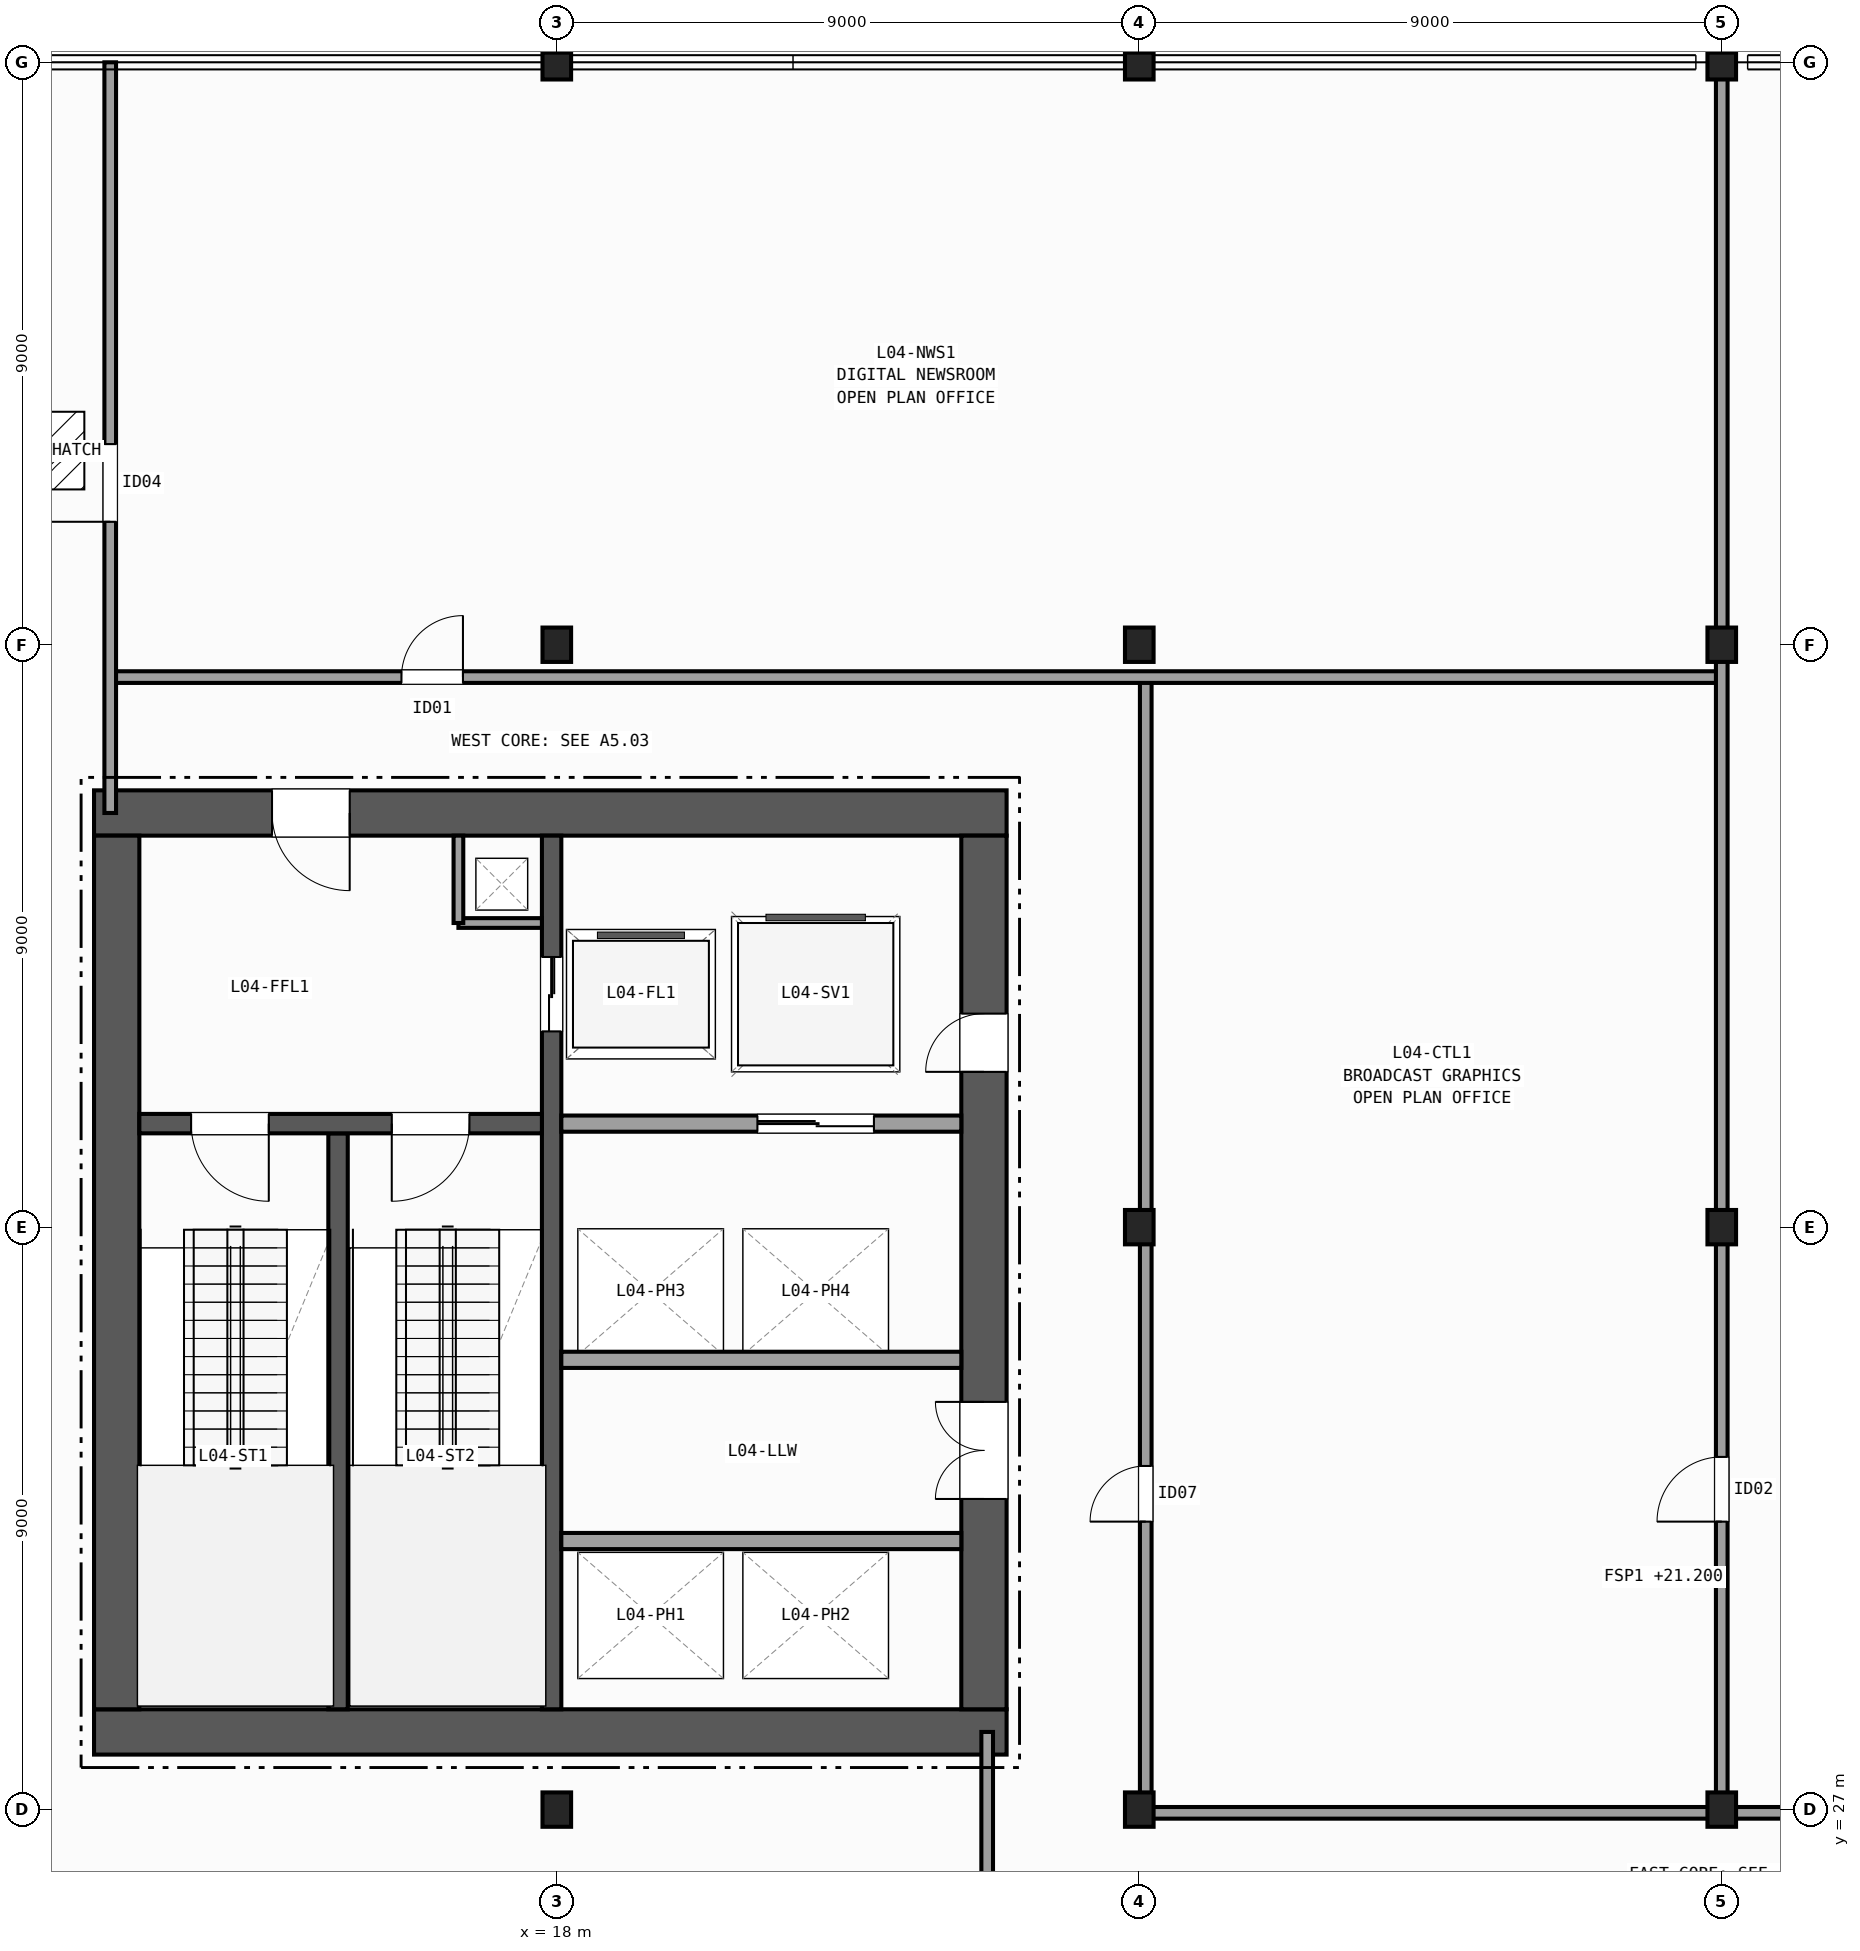
"""IFC4 building model, lengths in metres.
Left out: names, types, materials, properties, quantities, classifications, styles, units other than length and angle.
Written with IfcOpenShell. Run it as: python <this file> out.ifc"""

import sys

from ifc_helpers import new_model, si_unit, direction, frame, frame_2d, origin, origin_2d, place, context, subcontext, project, spatial, rectangle, i_section, extrude, element, fill, save


model = new_model("IFC4")
c1 = context("Model", 3, precision=1e-05, world=origin(), true_north=direction((0.0, 1.0)))
c2 = subcontext(c1, "Body", "Model", "MODEL_VIEW")
j1 = project(units=[si_unit("LENGTHUNIT", "METRE"), si_unit("PLANEANGLEUNIT", "RADIAN")], contexts=[c1])
p1 = place(None, origin())
s1 = spatial("IfcSite", under=j1, at=p1, CompositionType="ELEMENT")
p2 = place(p1, origin())
s2 = spatial("IfcBuilding", under=s1, at=p2, CompositionType="ELEMENT")
p3 = place(p2, frame((0.0, 0.0, 21.2)))
s3 = spatial("IfcBuildingStorey", under=s2, at=p3, CompositionType="ELEMENT", Elevation=21.2)
for number, where, z_axis, x_axis in (
    (1, (18.0, 27.0, 0.0), (0.0, 0.0, 1.0), (1.0, 0.0, 0.0)),
    (2, (18.0, 45.0, 0.0), (0.0, 0.0, 1.0), (1.0, 0.0, 0.0)),
    (3, (18.0, 54.0, 0.0), (0.0, 0.0, 1.0), (1.0, 0.0, 0.0)),
    (4, (27.0, 27.0, 0.0), (0.0, 0.0, 1.0), (1.0, 0.0, 0.0)),
    (5, (27.0, 36.0, 0.0), (0.0, 0.0, 1.0), (1.0, 0.0, 0.0)),
    (6, (27.0, 45.0, 0.0), (0.0, 0.0, 1.0), (1.0, 0.0, 0.0)),
    (7, (27.0, 54.0, 0.0), (0.0, 0.0, 1.0), (1.0, 0.0, 0.0)),
    (8, (36.0, 27.0, 0.0), (0.0, 0.0, 1.0), (1.0, 0.0, 0.0)),
    (9, (36.0, 36.0, 0.0), (0.0, 0.0, 1.0), (1.0, 0.0, 0.0)),
    (10, (36.0, 45.0, 0.0), (0.0, 0.0, 1.0), (1.0, 0.0, 0.0)),
    (11, (36.0, 54.0, 0.0), (0.0, 0.0, 1.0), (1.0, 0.0, 0.0)),
):
    element("IfcColumn", number, at=place(p3, frame(where, z_axis=z_axis, x_axis=x_axis)), inside=s3, PredefinedType="COLUMN", context=c2, shape_type="SweptSolid", body=[
        extrude(i_section(OverallWidth=0.442, OverallDepth=0.531, WebThickness=0.066, FlangeThickness=0.106, FilletRadius=0.015, at=origin_2d()), origin(), (0.0, 0.0, 1.0), 4.8),
    ])
p4 = place(p3, frame((10.85, 28.2, 0.0), z_axis=(0.0, 0.0, 1.0), x_axis=(1.0, 0.0, 0.0)))
e12 = element("IfcWall", 12, at=p4, inside=s3, PredefinedType="SHEAR", context=c2, shape_type="SweptSolid", body=[
    extrude(rectangle(XDim=14.1, YDim=0.7, at=frame_2d((7.05, 0.0))), origin(), (0.0, 0.0, 1.0), 4.48),
])
p5 = place(p3, frame((24.95, 42.4, 0.0), z_axis=(0.0, 0.0, 1.0), x_axis=(-1.0, 0.0, 0.0)))
e13 = element("IfcWall", 13, at=p5, inside=s3, PredefinedType="SHEAR", context=c2, shape_type="SweptSolid", body=[
    extrude(rectangle(XDim=14.1, YDim=0.7, at=frame_2d((7.05, 0.0))), origin(), (0.0, 0.0, 1.0), 4.48),
])
p6 = place(p5, frame((10.15, 0.0, 0.0)))
e14 = element("IfcOpeningElement", 14, at=p6, cuts=e13, PredefinedType="OPENING", context=c2, shape_type="SweptSolid", body=[
    extrude(rectangle(XDim=1.2, YDim=2.15, at=frame_2d((0.6, 1.075))), frame((0.0, 0.36, 0.0), z_axis=(0.0, -1.0, 0.0), x_axis=(1.0, 0.0, 0.0)), (0.0, 0.0, 1.0), 0.72),
])
p7 = place(p3, frame((11.2, 42.05, 0.0), z_axis=(0.0, 0.0, 1.0), x_axis=(0.0, -1.0, 0.0)))
e15 = element("IfcWall", 15, at=p7, inside=s3, PredefinedType="SHEAR", context=c2, shape_type="SweptSolid", body=[
    extrude(rectangle(XDim=13.5, YDim=0.7, at=frame_2d((6.75, 0.0))), origin(), (0.0, 0.0, 1.0), 4.48),
])
p8 = place(p3, frame((24.6, 28.55, 0.0), z_axis=(0.0, 0.0, 1.0), x_axis=(0.0, 1.0, 0.0)))
e16 = element("IfcWall", 16, at=p8, inside=s3, PredefinedType="SHEAR", context=c2, shape_type="SweptSolid", body=[
    extrude(rectangle(XDim=13.5, YDim=0.7, at=frame_2d((6.75, 0.0))), origin(), (0.0, 0.0, 1.0), 4.48),
])
p9 = place(p8, frame((3.25, 0.0, 0.0)))
e17 = element("IfcOpeningElement", 17, at=p9, cuts=e16, PredefinedType="OPENING", context=c2, shape_type="SweptSolid", body=[
    extrude(rectangle(XDim=1.5, YDim=2.2, at=frame_2d((0.75, 1.1))), frame((0.0, 0.36, 0.0), z_axis=(0.0, -1.0, 0.0), x_axis=(1.0, 0.0, 0.0)), (0.0, 0.0, 1.0), 0.72),
])
p10 = place(p8, frame((9.85, 0.0, 0.0)))
e18 = element("IfcOpeningElement", 18, at=p10, cuts=e16, PredefinedType="OPENING", context=c2, shape_type="SweptSolid", body=[
    extrude(rectangle(XDim=0.9, YDim=2.1, at=frame_2d((0.45, 1.05))), frame((0.0, 0.36, 0.0), z_axis=(0.0, -1.0, 0.0), x_axis=(1.0, 0.0, 0.0)), (0.0, 0.0, 1.0), 0.72),
])
p11 = place(p3, frame((14.62, 28.55, 0.0), z_axis=(0.0, 0.0, 1.0), x_axis=(0.0, 1.0, 0.0)))
e19 = element("IfcWall", 19, at=p11, inside=s3, PredefinedType="SHEAR", context=c2, shape_type="SweptSolid", body=[
    extrude(rectangle(XDim=8.9, YDim=0.3, at=frame_2d((4.45, 0.0))), origin(), (0.0, 0.0, 1.0), 4.48),
])
p12 = place(p3, frame((17.92, 42.05, 0.0), z_axis=(0.0, 0.0, 1.0), x_axis=(0.0, -1.0, 0.0)))
e20 = element("IfcWall", 20, at=p12, inside=s3, PredefinedType="SHEAR", context=c2, shape_type="SweptSolid", body=[
    extrude(rectangle(XDim=13.5, YDim=0.3, at=frame_2d((6.75, 0.0))), origin(), (0.0, 0.0, 1.0), 4.48),
])
p13 = place(p12, frame((1.875, 0.0, 0.0)))
e21 = element("IfcOpeningElement", 21, at=p13, cuts=e20, PredefinedType="OPENING", context=c2, shape_type="SweptSolid", body=[
    extrude(rectangle(XDim=1.15, YDim=2.15, at=frame_2d((0.575, 1.075))), frame((0.0, 0.16, 0.0), z_axis=(0.0, -1.0, 0.0), x_axis=(1.0, 0.0, 0.0)), (0.0, 0.0, 1.0), 0.32),
])
p14 = place(p3, frame((17.77, 37.6, 0.0), z_axis=(0.0, 0.0, 1.0), x_axis=(-1.0, 0.0, 0.0)))
e22 = element("IfcWall", 22, at=p14, inside=s3, PredefinedType="SHEAR", context=c2, shape_type="SweptSolid", body=[
    extrude(rectangle(XDim=6.22, YDim=0.3, at=frame_2d((3.11, 0.0))), origin(), (0.0, 0.0, 1.0), 4.48),
])
p15 = place(p14, frame((4.22, 0.0, 0.0)))
e23 = element("IfcOpeningElement", 23, at=p15, cuts=e22, PredefinedType="OPENING", context=c2, shape_type="SweptSolid", body=[
    extrude(rectangle(XDim=1.2, YDim=2.15, at=frame_2d((0.6, 1.075))), frame((0.0, 0.16, 0.0), z_axis=(0.0, -1.0, 0.0), x_axis=(1.0, 0.0, 0.0)), (0.0, 0.0, 1.0), 0.32),
])
p16 = place(p14, frame((1.12, 0.0, 0.0)))
e24 = element("IfcOpeningElement", 24, at=p16, cuts=e22, PredefinedType="OPENING", context=c2, shape_type="SweptSolid", body=[
    extrude(rectangle(XDim=1.2, YDim=2.15, at=frame_2d((0.6, 1.075))), frame((0.0, 0.16, 0.0), z_axis=(0.0, -1.0, 0.0), x_axis=(1.0, 0.0, 0.0)), (0.0, 0.0, 1.0), 0.32),
])
p17 = place(p3, frame((16.48, 40.7, 0.0), z_axis=(0.0, 0.0, 1.0), x_axis=(1.0, 0.0, 0.0)))
e25 = element("IfcWall", 25, at=p17, inside=s3, PredefinedType="PARTITIONING", context=c2, shape_type="SweptSolid", body=[
    extrude(rectangle(XDim=1.29, YDim=0.15, at=frame_2d((0.645, 0.0))), origin(), (0.0, 0.0, 1.0), 4.48),
])
p18 = place(p3, frame((16.48, 40.7, 0.0), z_axis=(0.0, 0.0, 1.0), x_axis=(0.0, 1.0, 0.0)))
e26 = element("IfcWall", 26, at=p18, inside=s3, PredefinedType="PARTITIONING", context=c2, shape_type="SweptSolid", body=[
    extrude(rectangle(XDim=1.35, YDim=0.15, at=frame_2d((0.675, 0.0))), origin(), (0.0, 0.0, 1.0), 4.48),
])
p19 = place(p3, frame((18.07, 37.6, 0.0), z_axis=(0.0, 0.0, 1.0), x_axis=(1.0, 0.0, 0.0)))
e27 = element("IfcWall", 27, at=p19, inside=s3, PredefinedType="PARTITIONING", context=c2, shape_type="SweptSolid", body=[
    extrude(rectangle(XDim=6.18, YDim=0.25, at=frame_2d((3.09, 0.0))), origin(), (0.0, 0.0, 1.0), 4.48),
])
p20 = place(p19, frame((3.03, 0.0, 0.0)))
e28 = element("IfcOpeningElement", 28, at=p20, cuts=e27, PredefinedType="OPENING", context=c2, shape_type="SweptSolid", body=[
    extrude(rectangle(XDim=1.8, YDim=2.3, at=frame_2d((0.9, 1.15))), frame((0.0, 0.135, 0.0), z_axis=(0.0, -1.0, 0.0), x_axis=(1.0, 0.0, 0.0)), (0.0, 0.0, 1.0), 0.27),
])
for number, where, z_axis, x_axis in (
    (29, (18.07, 31.15, 0.0), (0.0, 0.0, 1.0), (1.0, 0.0, 0.0)),
    (30, (24.25, 33.95, 0.0), (0.0, 0.0, 1.0), (-1.0, 0.0, 0.0)),
):
    element("IfcWall", number, at=place(p3, frame(where, z_axis=z_axis, x_axis=x_axis)), inside=s3, PredefinedType="PARTITIONING", context=c2, shape_type="SweptSolid", body=[
        extrude(rectangle(XDim=6.18, YDim=0.25, at=frame_2d((3.09, 0.0))), origin(), (0.0, 0.0, 1.0), 4.48),
    ])
p21 = place(p3, frame((24.65, 7.2, 0.0), z_axis=(0.0, 0.0, 1.0), x_axis=(0.0, 1.0, 0.0)))
e31 = element("IfcWall", 31, at=p21, inside=s3, PredefinedType="PARTITIONING", context=c2, shape_type="SweptSolid", body=[
    extrude(rectangle(XDim=21.0, YDim=0.18, at=frame_2d((10.5, 0.0))), origin(), (0.0, 0.0, 1.0), 3.512),
])
p22 = place(p21, frame((6.8, 0.0, 0.0)))
e32 = element("IfcOpeningElement", 32, at=p22, cuts=e31, PredefinedType="OPENING", context=c2, shape_type="SweptSolid", body=[
    extrude(rectangle(XDim=1.4, YDim=2.15, at=frame_2d((0.7, 1.075))), frame((0.0, 0.1, 0.0), z_axis=(0.0, -1.0, 0.0), x_axis=(1.0, 0.0, 0.0)), (0.0, 0.0, 1.0), 0.2),
])
p23 = place(p3, frame((27.1, 26.95, 0.0), z_axis=(0.0, 0.0, 1.0), x_axis=(1.0, 0.0, 0.0)))
e33 = element("IfcWall", 33, at=p23, inside=s3, PredefinedType="PARTITIONING", context=c2, shape_type="SweptSolid", body=[
    extrude(rectangle(XDim=35.9, YDim=0.18, at=frame_2d((17.95, 0.0))), origin(), (0.0, 0.0, 1.0), 3.533),
])
p24 = place(p3, frame((27.1, 26.95, 0.0), z_axis=(0.0, 0.0, 1.0), x_axis=(0.0, 1.0, 0.0)))
e34 = element("IfcWall", 34, at=p24, inside=s3, PredefinedType="PARTITIONING", context=c2, shape_type="SweptSolid", body=[
    extrude(rectangle(XDim=17.55, YDim=0.18, at=frame_2d((8.775, 0.0))), origin(), (0.0, 0.0, 1.0), 3.533),
])
p25 = place(p24, frame((4.5, 0.0, 0.0)))
e35 = element("IfcOpeningElement", 35, at=p25, cuts=e34, PredefinedType="OPENING", context=c2, shape_type="SweptSolid", body=[
    extrude(rectangle(XDim=0.86, YDim=2.05, at=frame_2d((0.43, 1.025))), frame((0.0, 0.1, 0.0), z_axis=(0.0, -1.0, 0.0), x_axis=(1.0, 0.0, 0.0)), (0.0, 0.0, 1.0), 0.2),
])
p26 = place(p3, frame((11.1, 44.5, 0.0), z_axis=(0.0, 0.0, 1.0), x_axis=(1.0, 0.0, 0.0)))
e36 = element("IfcWall", 36, at=p26, inside=s3, PredefinedType="PARTITIONING", context=c2, shape_type="SweptSolid", body=[
    extrude(rectangle(XDim=24.9, YDim=0.18, at=frame_2d((12.45, 0.0))), origin(), (0.0, 0.0, 1.0), 3.605),
])
p27 = place(p26, frame((4.5, 0.0, 0.0)))
e37 = element("IfcOpeningElement", 37, at=p27, cuts=e36, PredefinedType="OPENING", context=c2, shape_type="SweptSolid", body=[
    extrude(rectangle(XDim=0.95, YDim=2.1, at=frame_2d((0.475, 1.05))), frame((0.0, 0.1, 0.0), z_axis=(0.0, -1.0, 0.0), x_axis=(1.0, 0.0, 0.0)), (0.0, 0.0, 1.0), 0.2),
])
p28 = place(p3, frame((36.0, 26.95, 0.0), z_axis=(0.0, 0.0, 1.0), x_axis=(0.0, 1.0, 0.0)))
e38 = element("IfcWall", 38, at=p28, inside=s3, PredefinedType="PARTITIONING", context=c2, shape_type="SweptSolid", body=[
    extrude(rectangle(XDim=27.05, YDim=0.18, at=frame_2d((13.525, 0.0))), origin(), (0.0, 0.0, 1.0), 3.533),
])
p29 = place(p28, frame((4.5, 0.0, 0.0)))
e39 = element("IfcOpeningElement", 39, at=p29, cuts=e38, PredefinedType="OPENING", context=c2, shape_type="SweptSolid", body=[
    extrude(rectangle(XDim=1.0, YDim=2.1, at=frame_2d((0.5, 1.05))), frame((0.0, 0.1, 0.0), z_axis=(0.0, -1.0, 0.0), x_axis=(1.0, 0.0, 0.0)), (0.0, 0.0, 1.0), 0.2),
])
p30 = place(p3, frame((11.1, 42.4, 0.0), z_axis=(0.0, 0.0, 1.0), x_axis=(0.0, 1.0, 0.0)))
e40 = element("IfcWall", 40, at=p30, inside=s3, PredefinedType="PARTITIONING", context=c2, shape_type="SweptSolid", body=[
    extrude(rectangle(XDim=11.6, YDim=0.18, at=frame_2d((5.8, 0.0))), origin(), (0.0, 0.0, 1.0), 3.533),
])
p31 = place(p30, frame((4.5, 0.0, 0.0)))
e41 = element("IfcOpeningElement", 41, at=p31, cuts=e40, PredefinedType="OPENING", context=c2, shape_type="SweptSolid", body=[
    extrude(rectangle(XDim=1.2, YDim=2.15, at=frame_2d((0.6, 1.075))), frame((0.0, 0.1, 0.0), z_axis=(0.0, -1.0, 0.0), x_axis=(1.0, 0.0, 0.0)), (0.0, 0.0, 1.0), 0.2),
])
p32 = place(p3, frame((0.0, 0.0, -0.32)))
p33 = place(p32, frame((10.2, 48.0, 0.0)))
p34 = place(p33, frame((0.0, 0.0, 0.27)))
e42 = element("IfcDoor", 42, at=p34, inside=s3, OperationType="SINGLE_SWING_LEFT", PredefinedType="TRAPDOOR", context=c2, shape_type="SweptSolid", body=[
    extrude(rectangle(XDim=1.0, YDim=1.2, at=origin_2d()), origin(), (0.0, 0.0, 1.0), 0.05),
])
p35 = place(p15, origin())
e43 = element("IfcDoor", 43, at=p35, inside=s3, OperationType="SINGLE_SWING_LEFT", PredefinedType="DOOR", context=c2, shape_type="SweptSolid", body=[
    extrude(rectangle(XDim=1.2, YDim=2.15, at=frame_2d((0.6, 1.075))), frame((0.0, 0.025, 0.0), z_axis=(0.0, -1.0, 0.0), x_axis=(1.0, 0.0, 0.0)), (0.0, 0.0, 1.0), 0.05),
])
fill(e23, e43)
p36 = place(p16, origin())
e44 = element("IfcDoor", 44, at=p36, inside=s3, OperationType="SINGLE_SWING_RIGHT", PredefinedType="DOOR", context=c2, shape_type="SweptSolid", body=[
    extrude(rectangle(XDim=1.2, YDim=2.15, at=frame_2d((0.6, 1.075))), frame((0.0, 0.025, 0.0), z_axis=(0.0, -1.0, 0.0), x_axis=(1.0, 0.0, 0.0)), (0.0, 0.0, 1.0), 0.05),
])
fill(e24, e44)
p37 = place(p9, origin())
e45 = element("IfcDoor", 45, at=p37, inside=s3, OperationType="DOUBLE_DOOR_SINGLE_SWING", PredefinedType="DOOR", context=c2, shape_type="SweptSolid", body=[
    extrude(rectangle(XDim=1.5, YDim=2.2, at=frame_2d((0.75, 1.1))), frame((0.0, 0.025, 0.0), z_axis=(0.0, -1.0, 0.0), x_axis=(1.0, 0.0, 0.0)), (0.0, 0.0, 1.0), 0.05),
])
fill(e17, e45)
p38 = place(p6, origin())
e46 = element("IfcDoor", 46, at=p38, inside=s3, OperationType="SINGLE_SWING_LEFT", PredefinedType="DOOR", context=c2, shape_type="SweptSolid", body=[
    extrude(rectangle(XDim=1.2, YDim=2.15, at=frame_2d((0.6, 1.075))), frame((0.0, 0.025, 0.0), z_axis=(0.0, -1.0, 0.0), x_axis=(1.0, 0.0, 0.0)), (0.0, 0.0, 1.0), 0.05),
])
fill(e14, e46)
p39 = place(p10, origin())
e47 = element("IfcDoor", 47, at=p39, inside=s3, OperationType="SINGLE_SWING_LEFT", PredefinedType="DOOR", context=c2, shape_type="SweptSolid", body=[
    extrude(rectangle(XDim=0.9, YDim=2.1, at=frame_2d((0.45, 1.05))), frame((0.0, 0.025, 0.0), z_axis=(0.0, -1.0, 0.0), x_axis=(1.0, 0.0, 0.0)), (0.0, 0.0, 1.0), 0.05),
])
fill(e18, e47)
p40 = place(p13, origin())
e48 = element("IfcDoor", 48, at=p40, inside=s3, OperationType="DOUBLE_DOOR_SLIDING", PredefinedType="DOOR", context=c2, shape_type="SweptSolid", body=[
    extrude(rectangle(XDim=1.15, YDim=2.15, at=frame_2d((0.575, 1.075))), frame((0.0, 0.025, 0.0), z_axis=(0.0, -1.0, 0.0), x_axis=(1.0, 0.0, 0.0)), (0.0, 0.0, 1.0), 0.05),
])
fill(e21, e48)
p41 = place(p20, origin())
e49 = element("IfcDoor", 49, at=p41, inside=s3, OperationType="DOUBLE_DOOR_SLIDING", PredefinedType="DOOR", context=c2, shape_type="SweptSolid", body=[
    extrude(rectangle(XDim=1.8, YDim=2.3, at=frame_2d((0.9, 1.15))), frame((0.0, 0.025, 0.0), z_axis=(0.0, -1.0, 0.0), x_axis=(1.0, 0.0, 0.0)), (0.0, 0.0, 1.0), 0.05),
])
fill(e28, e49)
p42 = place(p25, origin())
e50 = element("IfcDoor", 50, at=p42, inside=s3, OperationType="SINGLE_SWING_LEFT", PredefinedType="DOOR", context=c2, shape_type="SweptSolid", body=[
    extrude(rectangle(XDim=0.86, YDim=2.05, at=frame_2d((0.43, 1.025))), frame((0.0, 0.025, 0.0), z_axis=(0.0, -1.0, 0.0), x_axis=(1.0, 0.0, 0.0)), (0.0, 0.0, 1.0), 0.05),
])
fill(e35, e50)
p43 = place(p27, origin())
e51 = element("IfcDoor", 51, at=p43, inside=s3, OperationType="SINGLE_SWING_RIGHT", PredefinedType="DOOR", context=c2, shape_type="SweptSolid", body=[
    extrude(rectangle(XDim=0.95, YDim=2.1, at=frame_2d((0.475, 1.05))), frame((0.0, 0.025, 0.0), z_axis=(0.0, -1.0, 0.0), x_axis=(1.0, 0.0, 0.0)), (0.0, 0.0, 1.0), 0.05),
])
fill(e37, e51)
p44 = place(p29, origin())
e52 = element("IfcDoor", 52, at=p44, inside=s3, OperationType="SINGLE_SWING_LEFT", PredefinedType="DOOR", context=c2, shape_type="SweptSolid", body=[
    extrude(rectangle(XDim=1.0, YDim=2.1, at=frame_2d((0.5, 1.05))), frame((0.0, 0.025, 0.0), z_axis=(0.0, -1.0, 0.0), x_axis=(1.0, 0.0, 0.0)), (0.0, 0.0, 1.0), 0.05),
])
fill(e39, e52)
p45 = place(p31, origin())
e53 = element("IfcDoor", 53, at=p45, inside=s3, OperationType="SINGLE_SWING_LEFT", PredefinedType="DOOR", context=c2, shape_type="SweptSolid", body=[
    extrude(rectangle(XDim=1.2, YDim=2.15, at=frame_2d((0.6, 1.075))), frame((0.0, 0.025, 0.0), z_axis=(0.0, -1.0, 0.0), x_axis=(1.0, 0.0, 0.0)), (0.0, 0.0, 1.0), 0.05),
])
fill(e41, e53)
save(model, sys.argv[1])
